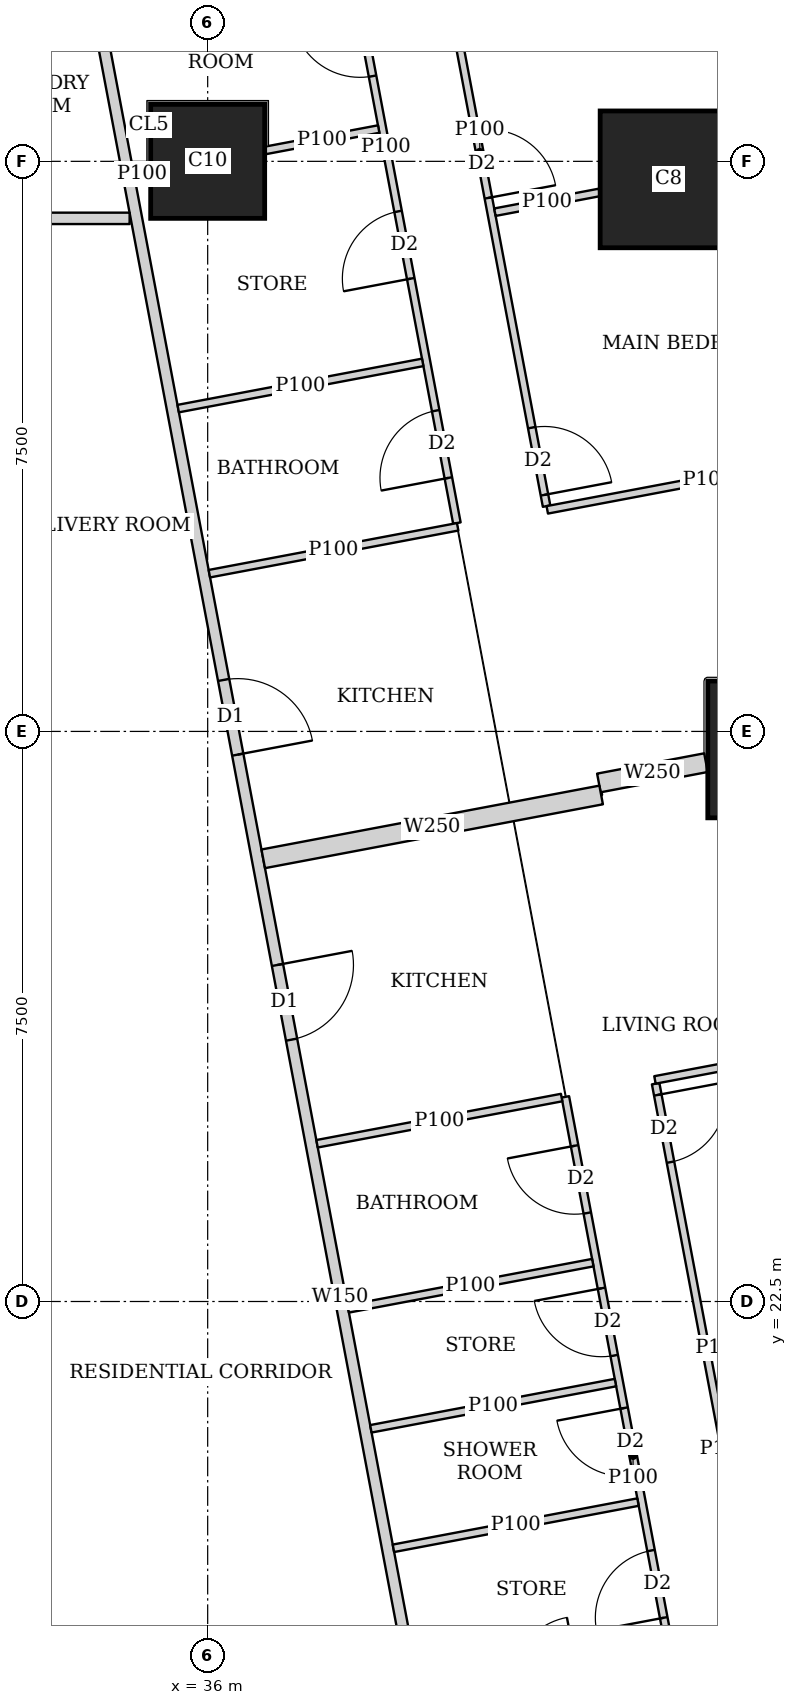
"""IFC4 building model, lengths in metres.
Left out: names, types, materials, properties, quantities, classifications, styles, units other than length and angle.
Written with IfcOpenShell. Run it as: python <this file> out.ifc"""

import sys

from ifc_helpers import new_model, si_unit, direction, frame, frame_2d, origin, origin_2d, place, context, subcontext, project, spatial, rectangle, extrude, element, fill, save


model = new_model("IFC4")
c1 = context("Model", 3, precision=1e-05, world=origin(), true_north=direction((0.0, 1.0)))
c2 = subcontext(c1, "Body", "Model", "MODEL_VIEW")
j1 = project(units=[si_unit("LENGTHUNIT", "METRE"), si_unit("PLANEANGLEUNIT", "RADIAN")], contexts=[c1])
p1 = place(None, origin())
s1 = spatial("IfcSite", under=j1, at=p1, CompositionType="ELEMENT")
p2 = place(p1, origin())
s2 = spatial("IfcBuilding", under=s1, at=p2, CompositionType="ELEMENT")
p3 = place(p2, frame((0.0, 0.0, 147.05)))
s3 = spatial("IfcBuildingStorey", under=s2, at=p3, CompositionType="ELEMENT", Elevation=147.05)
p4 = place(p3, frame((43.48, 29.763, 0.0), z_axis=(0.0, 0.0, 1.0), x_axis=(1.0, 0.0, 0.0)))
e1 = element("IfcColumn", 1, at=p4, inside=s3, PredefinedType="COLUMN", context=c2, shape_type="SweptSolid", body=[
    extrude(rectangle(XDim=1.8, YDim=1.8, at=origin_2d()), origin(), (0.0, 0.0, 1.0), 3.75),
])
p5 = place(p3, frame((36.0, 37.5, 0.0), z_axis=(0.0, 0.0, 1.0), x_axis=(1.0, 0.0, 0.0)))
e2 = element("IfcColumn", 2, at=p5, inside=s3, PredefinedType="COLUMN", context=c2, shape_type="SweptSolid", body=[
    extrude(rectangle(XDim=1.5, YDim=1.5, at=origin_2d()), origin(), (0.0, 0.0, 1.0), 3.75),
])
p6 = place(p3, frame((42.064, 37.263, 0.0), z_axis=(0.0, 0.0, 1.0), x_axis=(1.0, 0.0, 0.0)))
e3 = element("IfcColumn", 3, at=p6, inside=s3, PredefinedType="COLUMN", context=c2, shape_type="SweptSolid", body=[
    extrude(rectangle(XDim=1.8, YDim=1.8, at=origin_2d()), origin(), (0.0, 0.0, 1.0), 3.75),
])
p7 = place(p3, frame((29.551, 36.75, 0.0), z_axis=(0.0, 0.0, 1.0), x_axis=(1.0, 0.0, 0.0)))
e4 = element("IfcWall", 4, at=p7, inside=s3, PredefinedType="SOLIDWALL", context=c2, shape_type="SweptSolid", body=[
    extrude(rectangle(XDim=5.422, YDim=0.15, at=frame_2d((2.711, 0.0))), origin(), (0.0, 0.0, 1.0), 3.5),
])
p8 = place(p3, frame((33.877, 43.029, 0.0), z_axis=(0.0, 0.0, 1.0), x_axis=(0.185596841028, -0.98262597798, 0.0)))
e5 = element("IfcWall", 5, at=p8, inside=s3, PredefinedType="SOLIDWALL", context=c2, shape_type="SweptSolid", body=[
    extrude(rectangle(XDim=41.66, YDim=0.15, at=frame_2d((20.83, 0.0))), origin(), (0.0, 0.0, 1.0), 2.5),
])
p9 = place(p8, frame((12.57, 0.0, 0.0)))
e6 = element("IfcOpeningElement", 6, at=p9, cuts=e5, PredefinedType="OPENING", context=c2, shape_type="SweptSolid", body=[
    extrude(rectangle(XDim=1.0, YDim=2.1, at=frame_2d((0.5, 1.05))), frame((0.0, 0.085, 0.0), z_axis=(0.0, -1.0, 0.0), x_axis=(1.0, 0.0, 0.0)), (0.0, 0.0, 1.0), 0.17),
])
p10 = place(p8, frame((16.386, 0.0, 0.0)))
e7 = element("IfcOpeningElement", 7, at=p10, cuts=e5, PredefinedType="OPENING", context=c2, shape_type="SweptSolid", body=[
    extrude(rectangle(XDim=1.0, YDim=2.1, at=frame_2d((0.5, 1.05))), frame((0.0, 0.085, 0.0), z_axis=(0.0, -1.0, 0.0), x_axis=(1.0, 0.0, 0.0)), (0.0, 0.0, 1.0), 0.17),
])
p11 = place(p8, frame((31.166, 0.0, 0.0)))
e8 = element("IfcOpeningElement", 8, at=p11, cuts=e5, PredefinedType="OPENING", context=c2, shape_type="SweptSolid", body=[
    extrude(rectangle(XDim=1.0, YDim=2.1, at=frame_2d((0.5, 1.05))), frame((0.0, 0.085, 0.0), z_axis=(0.0, -1.0, 0.0), x_axis=(1.0, 0.0, 0.0)), (0.0, 0.0, 1.0), 0.17),
])
p12 = place(p3, frame((38.701, 42.27, 0.0), z_axis=(0.0, 0.0, 1.0), x_axis=(0.185634707842, -0.982618825, 0.0)))
e9 = element("IfcWall", 9, at=p12, inside=s3, PredefinedType="PARTITIONING", context=c2, shape_type="SweptSolid", body=[
    extrude(rectangle(XDim=9.47, YDim=0.1, at=frame_2d((4.735, 0.0))), origin(), (0.0, 0.0, 1.0), 3.5),
])
p13 = place(p12, frame((8.42, 0.0, 0.0)))
e10 = element("IfcOpeningElement", 10, at=p13, cuts=e9, PredefinedType="OPENING", context=c2, shape_type="SweptSolid", body=[
    extrude(rectangle(XDim=0.9, YDim=2.1, at=frame_2d((0.45, 1.05))), frame((0.0, 0.06, 0.0), z_axis=(0.0, -1.0, 0.0), x_axis=(1.0, 0.0, 0.0)), (0.0, 0.0, 1.0), 0.12),
])
p14 = place(p12, frame((4.444, 0.0, 0.0)))
e11 = element("IfcOpeningElement", 11, at=p14, cuts=e9, PredefinedType="OPENING", context=c2, shape_type="SweptSolid", body=[
    extrude(rectangle(XDim=0.9, YDim=2.1, at=frame_2d((0.45, 1.05))), frame((0.0, 0.06, 0.0), z_axis=(0.0, -1.0, 0.0), x_axis=(1.0, 0.0, 0.0)), (0.0, 0.0, 1.0), 0.12),
])
p15 = place(p3, frame((37.411, 42.638, 0.0), z_axis=(0.0, 0.0, 1.0), x_axis=(0.185485587071, -0.982646984928, 0.0)))
e12 = element("IfcWall", 12, at=p15, inside=s3, PredefinedType="PARTITIONING", context=c2, shape_type="SweptSolid", body=[
    extrude(rectangle(XDim=10.072, YDim=0.1, at=frame_2d((5.036, 0.0))), origin(), (0.0, 0.0, 1.0), 3.5),
])
p16 = place(p15, frame((8.567, 0.0, 0.0)))
e13 = element("IfcOpeningElement", 13, at=p16, cuts=e12, PredefinedType="OPENING", context=c2, shape_type="SweptSolid", body=[
    extrude(rectangle(XDim=0.9, YDim=2.1, at=frame_2d((0.45, 1.05))), frame((0.0, 0.06, 0.0), z_axis=(0.0, -1.0, 0.0), x_axis=(1.0, 0.0, 0.0)), (0.0, 0.0, 1.0), 0.12),
])
p17 = place(p15, frame((3.188, 0.0, 0.0)))
e14 = element("IfcOpeningElement", 14, at=p17, cuts=e12, PredefinedType="OPENING", context=c2, shape_type="SweptSolid", body=[
    extrude(rectangle(XDim=0.9, YDim=2.1, at=frame_2d((0.45, 1.05))), frame((0.0, 0.06, 0.0), z_axis=(0.0, -1.0, 0.0), x_axis=(1.0, 0.0, 0.0)), (0.0, 0.0, 1.0), 0.12),
])
p18 = place(p15, frame((1.129, 0.0, 0.0)))
e15 = element("IfcOpeningElement", 15, at=p18, cuts=e12, PredefinedType="OPENING", context=c2, shape_type="SweptSolid", body=[
    extrude(rectangle(XDim=0.9, YDim=2.1, at=frame_2d((0.45, 1.05))), frame((0.0, 0.06, 0.0), z_axis=(0.0, -1.0, 0.0), x_axis=(1.0, 0.0, 0.0)), (0.0, 0.0, 1.0), 0.12),
])
p19 = place(p15, frame((5.899, 0.0, 0.0)))
e16 = element("IfcOpeningElement", 16, at=p19, cuts=e12, PredefinedType="OPENING", context=c2, shape_type="SweptSolid", body=[
    extrude(rectangle(XDim=0.9, YDim=2.1, at=frame_2d((0.45, 1.05))), frame((0.0, 0.06, 0.0), z_axis=(0.0, -1.0, 0.0), x_axis=(1.0, 0.0, 0.0)), (0.0, 0.0, 1.0), 0.12),
])
p20 = place(p3, frame((41.154, 37.091, 0.0), z_axis=(0.0, 0.0, 1.0), x_axis=(-0.982586605669, -0.185805173125, 0.0)))
e17 = element("IfcWall", 17, at=p20, inside=s3, PredefinedType="PARTITIONING", context=c2, shape_type="SweptSolid", body=[
    extrude(rectangle(XDim=1.399, YDim=0.1, at=frame_2d((0.7, 0.0))), origin(), (0.0, 0.0, 1.0), 3.5),
])
p21 = place(p3, frame((44.693, 33.713, 0.0), z_axis=(0.0, 0.0, 1.0), x_axis=(-0.982633535512, -0.185556823879, 0.0)))
e18 = element("IfcWall", 18, at=p21, inside=s3, PredefinedType="PARTITIONING", context=c2, shape_type="SweptSolid", body=[
    extrude(rectangle(XDim=4.3, YDim=0.1, at=frame_2d((2.15, 0.0))), origin(), (0.0, 0.0, 1.0), 2.1),
])
p22 = place(p3, frame((38.25, 37.925, 0.0), z_axis=(0.0, 0.0, 1.0), x_axis=(-0.982676595259, -0.18532865167, 0.0)))
e19 = element("IfcWall", 19, at=p22, inside=s3, PredefinedType="PARTITIONING", context=c2, shape_type="SweptSolid", body=[
    extrude(rectangle(XDim=1.516, YDim=0.1, at=frame_2d((0.758, 0.0))), origin(), (0.0, 0.0, 1.0), 3.5),
])
p23 = place(p3, frame((35.24, 37.356, 0.0), z_axis=(0.0, 0.0, 1.0), x_axis=(-0.982819911474, -0.184567119526, 0.0)))
e20 = element("IfcWall", 20, at=p23, inside=s3, PredefinedType="PARTITIONING", context=c2, shape_type="SweptSolid", body=[
    extrude(rectangle(XDim=0.212, YDim=0.1, at=frame_2d((0.106, 0.0))), origin(), (0.0, 0.0, 1.0), 3.5),
])
p24 = place(p3, frame((39.289, 32.692, 0.0), z_axis=(0.0, 0.0, 1.0), x_axis=(-0.982633623707, -0.185556356831, 0.0)))
e21 = element("IfcWall", 21, at=p24, inside=s3, PredefinedType="PARTITIONING", context=c2, shape_type="SweptSolid", body=[
    extrude(rectangle(XDim=3.325, YDim=0.1, at=frame_2d((1.663, 0.0))), origin(), (0.0, 0.0, 1.0), 3.5),
])
p25 = place(p3, frame((38.829, 34.855, 0.0), z_axis=(0.0, 0.0, 1.0), x_axis=(-0.982610347627, -0.185679575441, 0.0)))
e22 = element("IfcWall", 22, at=p25, inside=s3, PredefinedType="PARTITIONING", context=c2, shape_type="SweptSolid", body=[
    extrude(rectangle(XDim=3.274, YDim=0.1, at=frame_2d((1.637, 0.0))), origin(), (0.0, 0.0, 1.0), 3.5),
])
p26 = place(p3, frame((41.894, 25.366, 0.0), z_axis=(0.0, 0.0, 1.0), x_axis=(0.1856544654, -0.982615092229, 0.0)))
e23 = element("IfcWall", 23, at=p26, inside=s3, PredefinedType="PARTITIONING", context=c2, shape_type="SweptSolid", body=[
    extrude(rectangle(XDim=9.776, YDim=0.1, at=frame_2d((4.888, 0.0))), origin(), (0.0, 0.0, 1.0), 2.5),
])
p27 = place(p26, frame((0.151, 0.0, 0.0)))
e24 = element("IfcOpeningElement", 24, at=p27, cuts=e23, PredefinedType="OPENING", context=c2, shape_type="SweptSolid", body=[
    extrude(rectangle(XDim=0.9, YDim=2.1, at=frame_2d((0.45, 1.05))), frame((0.0, 0.06, 0.0), z_axis=(0.0, -1.0, 0.0), x_axis=(1.0, 0.0, 0.0)), (0.0, 0.0, 1.0), 0.12),
])
p28 = place(p26, frame((5.05, 0.0, 0.0)))
e25 = element("IfcOpeningElement", 25, at=p28, cuts=e23, PredefinedType="OPENING", context=c2, shape_type="SweptSolid", body=[
    extrude(rectangle(XDim=0.9, YDim=2.1, at=frame_2d((0.45, 1.05))), frame((0.0, 0.06, 0.0), z_axis=(0.0, -1.0, 0.0), x_axis=(1.0, 0.0, 0.0)), (0.0, 0.0, 1.0), 0.12),
])
p29 = place(p26, frame((7.783, 0.0, 0.0)))
e26 = element("IfcOpeningElement", 26, at=p29, cuts=e23, PredefinedType="OPENING", context=c2, shape_type="SweptSolid", body=[
    extrude(rectangle(XDim=0.9, YDim=2.1, at=frame_2d((0.45, 1.05))), frame((0.0, 0.06, 0.0), z_axis=(0.0, -1.0, 0.0), x_axis=(1.0, 0.0, 0.0)), (0.0, 0.0, 1.0), 0.12),
])
p30 = place(p3, frame((40.706, 25.192, 0.0), z_axis=(0.0, 0.0, 1.0), x_axis=(0.185610321375, -0.982623431737, 0.0)))
e27 = element("IfcWall", 27, at=p30, inside=s3, PredefinedType="PARTITIONING", context=c2, shape_type="SweptSolid", body=[
    extrude(rectangle(XDim=9.601, YDim=0.1, at=frame_2d((4.8, 0.0))), origin(), (0.0, 0.0, 1.0), 2.5),
])
p31 = place(p30, frame((0.655, 0.0, 0.0)))
e28 = element("IfcOpeningElement", 28, at=p31, cuts=e27, PredefinedType="OPENING", context=c2, shape_type="SweptSolid", body=[
    extrude(rectangle(XDim=0.9, YDim=2.1, at=frame_2d((0.45, 1.05))), frame((0.0, 0.06, 0.0), z_axis=(0.0, -1.0, 0.0), x_axis=(1.0, 0.0, 0.0)), (0.0, 0.0, 1.0), 0.12),
])
p32 = place(p30, frame((4.166, 0.0, 0.0)))
e29 = element("IfcOpeningElement", 29, at=p32, cuts=e27, PredefinedType="OPENING", context=c2, shape_type="SweptSolid", body=[
    extrude(rectangle(XDim=0.9, YDim=2.1, at=frame_2d((0.45, 1.05))), frame((0.0, 0.06, 0.0), z_axis=(0.0, -1.0, 0.0), x_axis=(1.0, 0.0, 0.0)), (0.0, 0.0, 1.0), 0.12),
])
p33 = place(p30, frame((2.563, 0.0, 0.0)))
e30 = element("IfcOpeningElement", 30, at=p33, cuts=e27, PredefinedType="OPENING", context=c2, shape_type="SweptSolid", body=[
    extrude(rectangle(XDim=0.9, YDim=2.1, at=frame_2d((0.45, 1.05))), frame((0.0, 0.06, 0.0), z_axis=(0.0, -1.0, 0.0), x_axis=(1.0, 0.0, 0.0)), (0.0, 0.0, 1.0), 0.12),
])
p34 = place(p30, frame((6.074, 0.0, 0.0)))
e31 = element("IfcOpeningElement", 31, at=p34, cuts=e27, PredefinedType="OPENING", context=c2, shape_type="SweptSolid", body=[
    extrude(rectangle(XDim=0.9, YDim=2.1, at=frame_2d((0.45, 1.05))), frame((0.0, 0.06, 0.0), z_axis=(0.0, -1.0, 0.0), x_axis=(1.0, 0.0, 0.0)), (0.0, 0.0, 1.0), 0.12),
])
p35 = place(p3, frame((46.11, 26.213, 0.0), z_axis=(0.0, 0.0, 1.0), x_axis=(-0.982633535512, -0.185556823879, 0.0)))
e32 = element("IfcWall", 32, at=p35, inside=s3, PredefinedType="PARTITIONING", context=c2, shape_type="SweptSolid", body=[
    extrude(rectangle(XDim=4.3, YDim=0.1, at=frame_2d((2.15, 0.0))), origin(), (0.0, 0.0, 1.0), 2.1),
])
p36 = place(p3, frame((42.887, 21.921, 0.0), z_axis=(0.0, 0.0, 1.0), x_axis=(-0.982688058078, -0.185267861514, 0.0)))
e33 = element("IfcWall", 33, at=p36, inside=s3, PredefinedType="PARTITIONING", context=c2, shape_type="SweptSolid", body=[
    extrude(rectangle(XDim=0.286, YDim=0.1, at=frame_2d((0.143, 0.0))), origin(), (0.0, 0.0, 1.0), 2.5),
])
for number, where, z_axis, x_axis in (
    (34, (40.657, 25.183, 0.0), (0.0, 0.0, 1.0), (-0.983, -0.186, 0.0)),
    (35, (41.365, 21.433, 0.0), (0.0, 0.0, 1.0), (-0.983, -0.186, 0.0)),
):
    element("IfcWall", number, at=place(p3, frame(where, z_axis=z_axis, x_axis=x_axis)), inside=s3, PredefinedType="PARTITIONING", context=c2, shape_type="SweptSolid", body=[
        extrude(rectangle(XDim=3.275, YDim=0.1, at=frame_2d((1.637, 0.0))), origin(), (0.0, 0.0, 1.0), 3.5),
    ])
p37 = place(p3, frame((41.067, 23.011, 0.0), z_axis=(0.0, 0.0, 1.0), x_axis=(-0.982618057925, -0.185638768151, 0.0)))
e36 = element("IfcWall", 36, at=p37, inside=s3, PredefinedType="PARTITIONING", context=c2, shape_type="SweptSolid", body=[
    extrude(rectangle(XDim=3.275, YDim=0.1, at=frame_2d((1.637, 0.0))), origin(), (0.0, 0.0, 1.0), 2.5),
])
p38 = place(p3, frame((41.662, 19.861, 0.0), z_axis=(0.0, 0.0, 1.0), x_axis=(-0.982607026909, -0.185697147715, 0.0)))
e37 = element("IfcWall", 37, at=p38, inside=s3, PredefinedType="PARTITIONING", context=c2, shape_type="SweptSolid", body=[
    extrude(rectangle(XDim=3.275, YDim=0.1, at=frame_2d((1.637, 0.0))), origin(), (0.0, 0.0, 1.0), 3.5),
])
p39 = place(p3, frame((42.556, 29.589, 0.0), z_axis=(0.0, 0.0, 1.0), x_axis=(-0.982502104561, -0.18625148196, 0.0)))
e38 = element("IfcWall", 38, at=p39, inside=s3, PredefinedType="SOLIDWALL", context=c2, shape_type="SweptSolid", body=[
    extrude(rectangle(XDim=1.434, YDim=0.25, at=frame_2d((0.717, 0.0))), origin(), (0.0, 0.0, 1.0), 2.1),
])
p40 = place(p3, frame((41.177, 29.164, 0.0), z_axis=(0.0, 0.0, 1.0), x_axis=(-0.982612837616, -0.185666398014, 0.0)))
e39 = element("IfcWall", 39, at=p40, inside=s3, PredefinedType="SOLIDWALL", context=c2, shape_type="SweptSolid", body=[
    extrude(rectangle(XDim=4.525, YDim=0.25, at=frame_2d((2.262, 0.0))), origin(), (0.0, 0.0, 1.0), 2.5),
])
p41 = place(p3, frame((34.638, 10.174, 0.0), z_axis=(0.0, 0.0, 1.0), x_axis=(-0.185583626094, 0.982628473903, 0.0)))
e40 = element("IfcWall", 40, at=p41, inside=s3, PredefinedType="PARTITIONING", context=c2, shape_type="SweptSolid", body=[
    extrude(rectangle(XDim=11.767, YDim=0.125, at=frame_2d((5.884, 0.0))), origin(), (0.0, 0.0, 1.0), 3.5),
])
p42 = place(p41, frame((0.697, 0.0, 0.0)))
e41 = element("IfcOpeningElement", 41, at=p42, cuts=e40, PredefinedType="OPENING", context=c2, shape_type="SweptSolid", body=[
    extrude(rectangle(XDim=1.0, YDim=2.1, at=frame_2d((0.5, 1.05))), frame((0.0, 0.073, 0.0), z_axis=(0.0, -1.0, 0.0), x_axis=(1.0, 0.0, 0.0)), (0.0, 0.0, 1.0), 0.145),
])
p43 = place(p41, frame((5.734, 0.0, 0.0)))
e42 = element("IfcOpeningElement", 42, at=p43, cuts=e40, PredefinedType="OPENING", context=c2, shape_type="SweptSolid", body=[
    extrude(rectangle(XDim=1.0, YDim=2.1, at=frame_2d((0.5, 1.05))), frame((0.0, 0.073, 0.0), z_axis=(0.0, -1.0, 0.0), x_axis=(1.0, 0.0, 0.0)), (0.0, 0.0, 1.0), 0.145),
])
p44 = place(p13, origin())
e43 = element("IfcDoor", 43, at=p44, inside=s3, OperationType="SINGLE_SWING_RIGHT", PredefinedType="DOOR", context=c2, shape_type="SweptSolid", body=[
    extrude(rectangle(XDim=0.9, YDim=2.1, at=frame_2d((0.45, 1.05))), frame((0.0, 0.025, 0.0), z_axis=(0.0, -1.0, 0.0), x_axis=(1.0, 0.0, 0.0)), (0.0, 0.0, 1.0), 0.05),
])
fill(e10, e43)
p45 = place(p14, origin())
e44 = element("IfcDoor", 44, at=p45, inside=s3, OperationType="SINGLE_SWING_RIGHT", PredefinedType="DOOR", context=c2, shape_type="SweptSolid", body=[
    extrude(rectangle(XDim=0.9, YDim=2.1, at=frame_2d((0.45, 1.05))), frame((0.0, 0.025, 0.0), z_axis=(0.0, -1.0, 0.0), x_axis=(1.0, 0.0, 0.0)), (0.0, 0.0, 1.0), 0.05),
])
fill(e11, e44)
p46 = place(p16, origin())
e45 = element("IfcDoor", 45, at=p46, inside=s3, OperationType="SINGLE_SWING_LEFT", PredefinedType="DOOR", context=c2, shape_type="SweptSolid", body=[
    extrude(rectangle(XDim=0.9, YDim=2.1, at=frame_2d((0.45, 1.05))), frame((0.0, 0.025, 0.0), z_axis=(0.0, -1.0, 0.0), x_axis=(1.0, 0.0, 0.0)), (0.0, 0.0, 1.0), 0.05),
])
fill(e13, e45)
p47 = place(p17, origin())
e46 = element("IfcDoor", 46, at=p47, inside=s3, OperationType="SINGLE_SWING_RIGHT", PredefinedType="DOOR", context=c2, shape_type="SweptSolid", body=[
    extrude(rectangle(XDim=0.9, YDim=2.1, at=frame_2d((0.45, 1.05))), frame((0.0, 0.025, 0.0), z_axis=(0.0, -1.0, 0.0), x_axis=(1.0, 0.0, 0.0)), (0.0, 0.0, 1.0), 0.05),
])
fill(e14, e46)
p48 = place(p19, origin())
e47 = element("IfcDoor", 47, at=p48, inside=s3, OperationType="SINGLE_SWING_LEFT", PredefinedType="DOOR", context=c2, shape_type="SweptSolid", body=[
    extrude(rectangle(XDim=0.9, YDim=2.1, at=frame_2d((0.45, 1.05))), frame((0.0, 0.025, 0.0), z_axis=(0.0, -1.0, 0.0), x_axis=(1.0, 0.0, 0.0)), (0.0, 0.0, 1.0), 0.05),
])
fill(e16, e47)
p49 = place(p9, origin())
e48 = element("IfcDoor", 48, at=p49, inside=s3, OperationType="SINGLE_SWING_RIGHT", PredefinedType="DOOR", context=c2, shape_type="SweptSolid", body=[
    extrude(rectangle(XDim=1.0, YDim=2.1, at=frame_2d((0.5, 1.05))), frame((0.0, 0.025, 0.0), z_axis=(0.0, -1.0, 0.0), x_axis=(1.0, 0.0, 0.0)), (0.0, 0.0, 1.0), 0.05),
])
fill(e6, e48)
p50 = place(p27, origin())
e49 = element("IfcDoor", 49, at=p50, inside=s3, OperationType="SINGLE_SWING_LEFT", PredefinedType="DOOR", context=c2, shape_type="SweptSolid", body=[
    extrude(rectangle(XDim=0.9, YDim=2.1, at=frame_2d((0.45, 1.05))), frame((0.0, 0.025, 0.0), z_axis=(0.0, -1.0, 0.0), x_axis=(1.0, 0.0, 0.0)), (0.0, 0.0, 1.0), 0.05),
])
fill(e24, e49)
p51 = place(p31, origin())
e50 = element("IfcDoor", 50, at=p51, inside=s3, OperationType="SINGLE_SWING_RIGHT", PredefinedType="DOOR", context=c2, shape_type="SweptSolid", body=[
    extrude(rectangle(XDim=0.9, YDim=2.1, at=frame_2d((0.45, 1.05))), frame((0.0, 0.025, 0.0), z_axis=(0.0, -1.0, 0.0), x_axis=(1.0, 0.0, 0.0)), (0.0, 0.0, 1.0), 0.05),
])
fill(e28, e50)
p52 = place(p32, origin())
e51 = element("IfcDoor", 51, at=p52, inside=s3, OperationType="SINGLE_SWING_RIGHT", PredefinedType="DOOR", context=c2, shape_type="SweptSolid", body=[
    extrude(rectangle(XDim=0.9, YDim=2.1, at=frame_2d((0.45, 1.05))), frame((0.0, 0.025, 0.0), z_axis=(0.0, -1.0, 0.0), x_axis=(1.0, 0.0, 0.0)), (0.0, 0.0, 1.0), 0.05),
])
fill(e29, e51)
p53 = place(p33, origin())
e52 = element("IfcDoor", 52, at=p53, inside=s3, OperationType="SINGLE_SWING_RIGHT", PredefinedType="DOOR", context=c2, shape_type="SweptSolid", body=[
    extrude(rectangle(XDim=0.9, YDim=2.1, at=frame_2d((0.45, 1.05))), frame((0.0, 0.025, 0.0), z_axis=(0.0, -1.0, 0.0), x_axis=(1.0, 0.0, 0.0)), (0.0, 0.0, 1.0), 0.05),
])
fill(e30, e52)
p54 = place(p34, origin())
e53 = element("IfcDoor", 53, at=p54, inside=s3, OperationType="SINGLE_SWING_LEFT", PredefinedType="DOOR", context=c2, shape_type="SweptSolid", body=[
    extrude(rectangle(XDim=0.9, YDim=2.1, at=frame_2d((0.45, 1.05))), frame((0.0, 0.025, 0.0), z_axis=(0.0, -1.0, 0.0), x_axis=(1.0, 0.0, 0.0)), (0.0, 0.0, 1.0), 0.05),
])
fill(e31, e53)
p55 = place(p10, origin())
e54 = element("IfcDoor", 54, at=p55, inside=s3, OperationType="SINGLE_SWING_LEFT", PredefinedType="DOOR", context=c2, shape_type="SweptSolid", body=[
    extrude(rectangle(XDim=1.0, YDim=2.1, at=frame_2d((0.5, 1.05))), frame((0.0, 0.025, 0.0), z_axis=(0.0, -1.0, 0.0), x_axis=(1.0, 0.0, 0.0)), (0.0, 0.0, 1.0), 0.05),
])
fill(e7, e54)
save(model, sys.argv[1])
